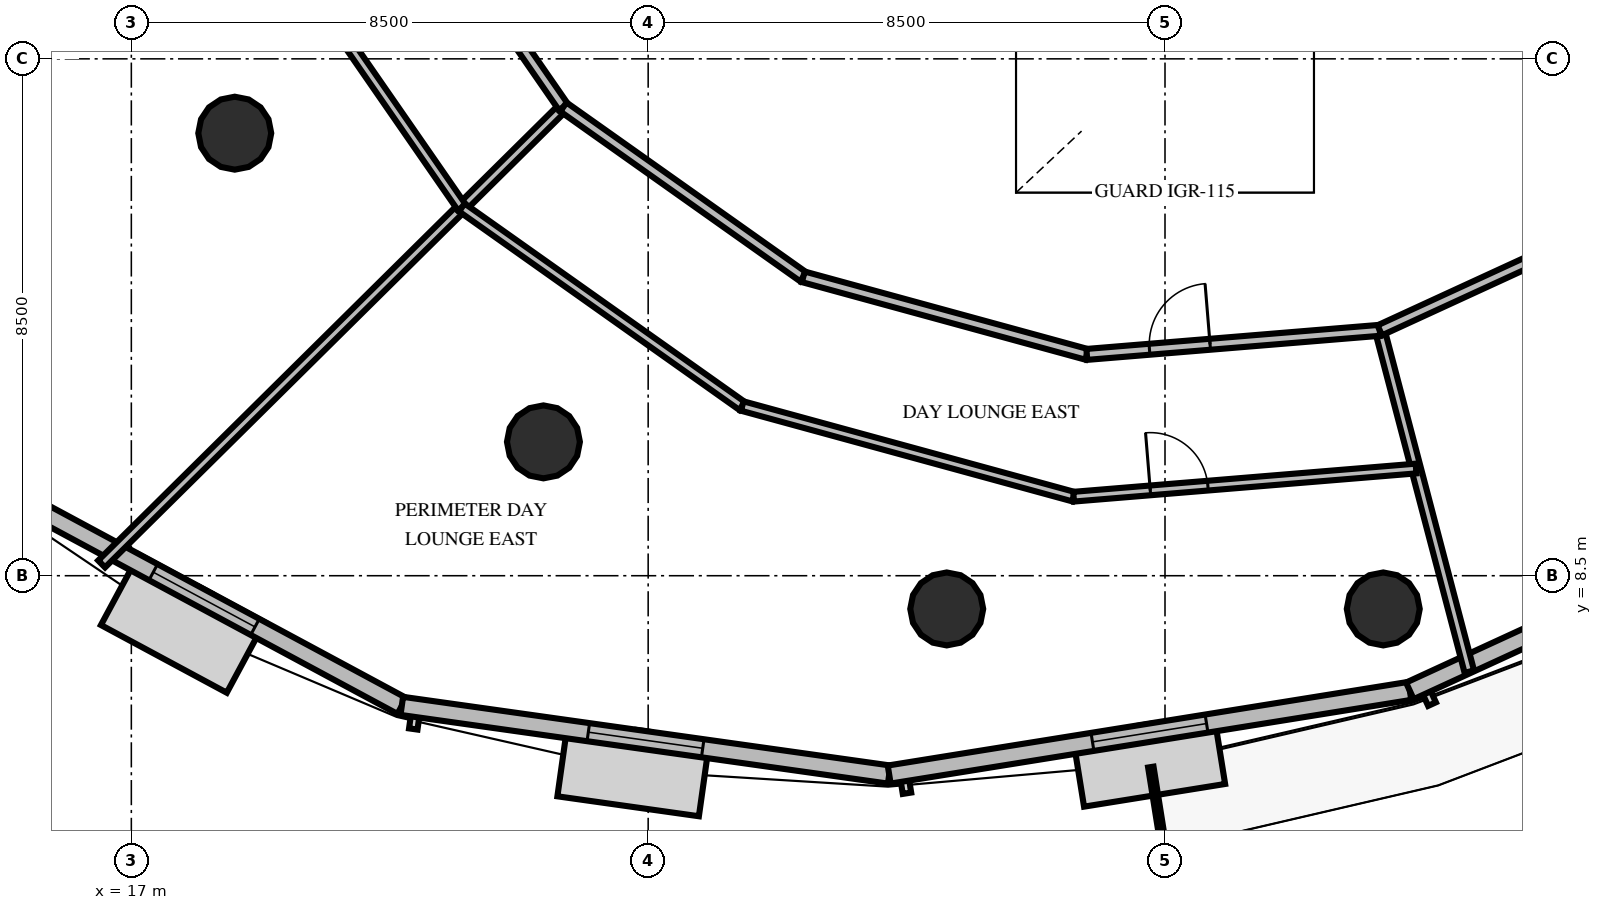
"""IFC4 building model, lengths in metres.
Left out: names, types, materials, properties, quantities, classifications, styles, units other than length and angle.
Written with IfcOpenShell. Run it as: python <this file> out.ifc"""

import sys

from ifc_helpers import new_model, si_unit, direction, frame, frame_2d, origin, origin_2d, place, context, subcontext, project, spatial, rectangle, circle, extrude, element, fill, save


model = new_model("IFC4")
c1 = context("Model", 3, precision=1e-05, world=origin(), true_north=direction((0.0, 1.0)))
c2 = subcontext(c1, "Body", "Model", "MODEL_VIEW")
j1 = project(units=[si_unit("LENGTHUNIT", "METRE"), si_unit("PLANEANGLEUNIT", "RADIAN")], contexts=[c1])
p1 = place(None, origin())
s1 = spatial("IfcSite", under=j1, at=p1, CompositionType="ELEMENT")
p2 = place(p1, origin())
s2 = spatial("IfcBuilding", under=s1, at=p2, CompositionType="ELEMENT")
p3 = place(p2, frame((0.0, 0.0, 137.8)))
s3 = spatial("IfcBuildingStorey", under=s2, at=p3, CompositionType="ELEMENT", Elevation=137.8)
for number, where, z_axis, x_axis in (
    (1, (18.701, 15.778, 0.0), (0.0, 0.0, 1.0), (1.0, 0.0, 0.0)),
    (2, (23.778, 10.701, 0.0), (0.0, 0.0, 1.0), (1.0, 0.0, 0.0)),
    (3, (30.41, 7.954, 0.0), (0.0, 0.0, 1.0), (1.0, 0.0, 0.0)),
    (4, (37.59, 7.954, 0.0), (0.0, 0.0, 1.0), (1.0, 0.0, 0.0)),
):
    element("IfcColumn", number, at=place(p3, frame(where, z_axis=z_axis, x_axis=x_axis)), inside=s3, PredefinedType="COLUMN", context=c2, shape_type="SweptSolid", body=[
        extrude(circle(Radius=0.6, at=origin_2d()), origin(), (0.0, 0.0, 1.0), 4.0),
    ])
p4 = place(p3, frame((14.946, 9.857, 0.0), z_axis=(0.0, 0.0, 1.0), x_axis=(0.880640929012, -0.473784290736, 0.0)))
e5 = element("IfcWall", 5, at=p4, inside=s3, PredefinedType="SOLIDWALL", context=c2, shape_type="SweptSolid", body=[
    extrude(rectangle(XDim=7.383, YDim=0.3, at=frame_2d((3.692, 0.0))), origin(), (0.0, 0.0, 1.0), 2.9),
])
p5 = place(p4, frame((2.742, 0.0, 0.8)))
e6 = element("IfcOpeningElement", 6, at=p5, cuts=e5, PredefinedType="OPENING", context=c2, shape_type="SweptSolid", body=[
    extrude(rectangle(XDim=1.9, YDim=1.95, at=frame_2d((0.95, 0.975))), frame((0.0, 0.16, 0.0), z_axis=(0.0, -1.0, 0.0), x_axis=(1.0, 0.0, 0.0)), (0.0, 0.0, 1.0), 0.32),
])
p6 = place(p3, frame((21.448, 6.359, 0.0), z_axis=(0.0, 0.0, 1.0), x_axis=(0.990224451803, -0.139483099518, 0.0)))
e7 = element("IfcWall", 7, at=p6, inside=s3, PredefinedType="SOLIDWALL", context=c2, shape_type="SweptSolid", body=[
    extrude(rectangle(XDim=8.095, YDim=0.3, at=frame_2d((4.048, 0.0))), origin(), (0.0, 0.0, 1.0), 2.9),
])
p7 = place(p6, frame((3.098, 0.0, 0.8)))
e8 = element("IfcOpeningElement", 8, at=p7, cuts=e7, PredefinedType="OPENING", context=c2, shape_type="SweptSolid", body=[
    extrude(rectangle(XDim=1.9, YDim=1.95, at=frame_2d((0.95, 0.975))), frame((0.0, 0.16, 0.0), z_axis=(0.0, -1.0, 0.0), x_axis=(1.0, 0.0, 0.0)), (0.0, 0.0, 1.0), 0.32),
])
p8 = place(p3, frame((29.464, 5.23, 0.0), z_axis=(0.0, 0.0, 1.0), x_axis=(0.987334308652, 0.158653594217, 0.0)))
e9 = element("IfcWall", 9, at=p8, inside=s3, PredefinedType="SOLIDWALL", context=c2, shape_type="SweptSolid", body=[
    extrude(rectangle(XDim=8.673, YDim=0.3, at=frame_2d((4.336, 0.0))), origin(), (0.0, 0.0, 1.0), 2.9),
])
p9 = place(p8, frame((3.386, 0.0, 0.8)))
e10 = element("IfcOpeningElement", 10, at=p9, cuts=e9, PredefinedType="OPENING", context=c2, shape_type="SweptSolid", body=[
    extrude(rectangle(XDim=1.9, YDim=1.95, at=frame_2d((0.95, 0.975))), frame((0.0, 0.16, 0.0), z_axis=(0.0, -1.0, 0.0), x_axis=(1.0, 0.0, 0.0)), (0.0, 0.0, 1.0), 0.32),
])
p10 = place(p3, frame((38.027, 6.606, 0.0), z_axis=(0.0, 0.0, 1.0), x_axis=(0.908512345051, 0.417858012835, 0.0)))
e11 = element("IfcWall", 11, at=p10, inside=s3, PredefinedType="SOLIDWALL", context=c2, shape_type="SweptSolid", body=[
    extrude(rectangle(XDim=8.891, YDim=0.3, at=frame_2d((4.445, 0.0))), origin(), (0.0, 0.0, 1.0), 2.9),
])
p11 = place(p10, frame((3.15, 0.0, 0.0)))
e12 = element("IfcOpeningElement", 12, at=p11, cuts=e11, PredefinedType="OPENING", context=c2, shape_type="SweptSolid", body=[
    extrude(rectangle(XDim=1.05, YDim=2.15, at=frame_2d((0.525, 1.075))), frame((0.0, 0.16, 0.0), z_axis=(0.0, -1.0, 0.0), x_axis=(1.0, 0.0, 0.0)), (0.0, 0.0, 1.0), 0.32),
])
p12 = place(p3, frame((24.106, 16.209, 0.0), z_axis=(0.0, 0.0, 1.0), x_axis=(-0.710810236464, -0.703383826754, 0.0)))
e13 = element("IfcWall", 13, at=p12, inside=s3, PredefinedType="PARTITIONING", context=c2, shape_type="SweptSolid", body=[
    extrude(rectangle(XDim=10.684, YDim=0.16, at=frame_2d((5.342, 0.0))), origin(), (0.0, 0.0, 1.0), 2.8),
])
p13 = place(p3, frame((21.354, 20.183, 0.0), z_axis=(0.0, 0.0, 1.0), x_axis=(0.569286130339, -0.822139466151, 0.0)))
e14 = element("IfcWall", 14, at=p13, inside=s3, PredefinedType="PARTITIONING", context=c2, shape_type="SweptSolid", body=[
    extrude(rectangle(XDim=4.834, YDim=0.18, at=frame_2d((2.417, 0.0))), origin(), (0.0, 0.0, 1.0), 2.8),
])
p14 = place(p3, frame((19.219, 19.201, 0.0), z_axis=(0.0, 0.0, 1.0), x_axis=(0.56929085893, -0.822136191843, 0.0)))
e15 = element("IfcWall", 15, at=p14, inside=s3, PredefinedType="PARTITIONING", context=c2, shape_type="SweptSolid", body=[
    extrude(rectangle(XDim=5.651, YDim=0.16, at=frame_2d((2.825, 0.0))), origin(), (0.0, 0.0, 1.0), 2.8),
])
p15 = place(p3, frame((37.532, 12.536, 0.0), z_axis=(0.0, 0.0, 1.0), x_axis=(0.253753983921, -0.967268791828, 0.0)))
e16 = element("IfcWall", 16, at=p15, inside=s3, PredefinedType="PARTITIONING", context=c2, shape_type="SweptSolid", body=[
    extrude(rectangle(XDim=5.803, YDim=0.16, at=frame_2d((2.902, 0.0))), origin(), (0.0, 0.0, 1.0), 2.8),
])
for number, where, z_axis, x_axis in (
    (17, (24.106, 16.209, 0.0), (0.0, 0.0, 1.0), (0.816, -0.578, 0.0)),
    (18, (28.051, 13.415, 0.0), (0.0, 0.0, 1.0), (0.965, -0.264, 0.0)),
):
    element("IfcWall", number, at=place(p3, frame(where, z_axis=z_axis, x_axis=x_axis)), inside=s3, PredefinedType="PARTITIONING", context=c2, shape_type="SweptSolid", body=[
        extrude(rectangle(XDim=4.834, YDim=0.18, at=frame_2d((2.417, 0.0))), origin(), (0.0, 0.0, 1.0), 2.8),
    ])
p16 = place(p3, frame((32.714, 12.139, 0.0), z_axis=(0.0, 0.0, 1.0), x_axis=(0.996635375419, 0.081962970069, 0.0)))
e19 = element("IfcWall", 19, at=p16, inside=s3, PredefinedType="PARTITIONING", context=c2, shape_type="SweptSolid", body=[
    extrude(rectangle(XDim=4.834, YDim=0.18, at=frame_2d((2.417, 0.0))), origin(), (0.0, 0.0, 1.0), 2.8),
])
p17 = place(p16, frame((1.034, 0.0, 0.0)))
e20 = element("IfcOpeningElement", 20, at=p17, cuts=e19, PredefinedType="OPENING", context=c2, shape_type="SweptSolid", body=[
    extrude(rectangle(XDim=1.0, YDim=2.15, at=frame_2d((0.5, 1.075))), frame((0.0, 0.1, 0.0), z_axis=(0.0, -1.0, 0.0), x_axis=(1.0, 0.0, 0.0)), (0.0, 0.0, 1.0), 0.2),
])
p18 = place(p3, frame((22.435, 14.556, 0.0), z_axis=(0.0, 0.0, 1.0), x_axis=(0.816120422412, -0.577881870388, 0.0)))
e21 = element("IfcWall", 21, at=p18, inside=s3, PredefinedType="PARTITIONING", context=c2, shape_type="SweptSolid", body=[
    extrude(rectangle(XDim=5.651, YDim=0.16, at=frame_2d((2.825, 0.0))), origin(), (0.0, 0.0, 1.0), 2.8),
])
p19 = place(p3, frame((27.047, 11.291, 0.0), z_axis=(0.0, 0.0, 1.0), x_axis=(0.96455912649, -0.263866806373, 0.0)))
e22 = element("IfcWall", 22, at=p19, inside=s3, PredefinedType="PARTITIONING", context=c2, shape_type="SweptSolid", body=[
    extrude(rectangle(XDim=5.65, YDim=0.16, at=frame_2d((2.825, 0.0))), origin(), (0.0, 0.0, 1.0), 2.8),
])
p20 = place(p3, frame((32.497, 9.8, 0.0), z_axis=(0.0, 0.0, 1.0), x_axis=(0.996635455181, 0.081962000194, 0.0)))
e23 = element("IfcWall", 23, at=p20, inside=s3, PredefinedType="PARTITIONING", context=c2, shape_type="SweptSolid", body=[
    extrude(rectangle(XDim=5.651, YDim=0.16, at=frame_2d((2.825, 0.0))), origin(), (0.0, 0.0, 1.0), 2.8),
])
p21 = place(p20, frame((1.265, 0.0, 0.0)))
e24 = element("IfcOpeningElement", 24, at=p21, cuts=e23, PredefinedType="OPENING", context=c2, shape_type="SweptSolid", body=[
    extrude(rectangle(XDim=0.95, YDim=2.15, at=frame_2d((0.475, 1.075))), frame((0.0, 0.09, 0.0), z_axis=(0.0, -1.0, 0.0), x_axis=(1.0, 0.0, 0.0)), (0.0, 0.0, 1.0), 0.18),
])
p22 = place(p3, frame((37.532, 12.536, 0.0), z_axis=(0.0, 0.0, 1.0), x_axis=(0.90849812175, 0.417888935935, 0.0)))
e25 = element("IfcWall", 25, at=p22, inside=s3, PredefinedType="PARTITIONING", context=c2, shape_type="SweptSolid", body=[
    extrude(rectangle(XDim=4.834, YDim=0.18, at=frame_2d((2.417, 0.0))), origin(), (0.0, 0.0, 1.0), 2.8),
])
p23 = place(p5, origin())
e26 = element("IfcWindow", 26, at=p23, inside=s3, PartitioningType="SINGLE_PANEL", PredefinedType="WINDOW", context=c2, shape_type="SweptSolid", body=[
    extrude(rectangle(XDim=1.9, YDim=1.95, at=frame_2d((0.95, 0.975))), frame((0.0, 0.03, 0.0), z_axis=(0.0, -1.0, 0.0), x_axis=(1.0, 0.0, 0.0)), (0.0, 0.0, 1.0), 0.06),
])
fill(e6, e26)
p24 = place(p7, origin())
e27 = element("IfcWindow", 27, at=p24, inside=s3, PartitioningType="SINGLE_PANEL", PredefinedType="WINDOW", context=c2, shape_type="SweptSolid", body=[
    extrude(rectangle(XDim=1.9, YDim=1.95, at=frame_2d((0.95, 0.975))), frame((0.0, 0.03, 0.0), z_axis=(0.0, -1.0, 0.0), x_axis=(1.0, 0.0, 0.0)), (0.0, 0.0, 1.0), 0.06),
])
fill(e8, e27)
p25 = place(p9, origin())
e28 = element("IfcWindow", 28, at=p25, inside=s3, PartitioningType="SINGLE_PANEL", PredefinedType="WINDOW", context=c2, shape_type="SweptSolid", body=[
    extrude(rectangle(XDim=1.9, YDim=1.95, at=frame_2d((0.95, 0.975))), frame((0.0, 0.03, 0.0), z_axis=(0.0, -1.0, 0.0), x_axis=(1.0, 0.0, 0.0)), (0.0, 0.0, 1.0), 0.06),
])
fill(e10, e28)
p26 = place(p17, origin())
e29 = element("IfcDoor", 29, at=p26, inside=s3, OperationType="SINGLE_SWING_RIGHT", PredefinedType="DOOR", context=c2, shape_type="SweptSolid", body=[
    extrude(rectangle(XDim=1.0, YDim=2.15, at=frame_2d((0.5, 1.075))), frame((0.0, 0.025, 0.0), z_axis=(0.0, -1.0, 0.0), x_axis=(1.0, 0.0, 0.0)), (0.0, 0.0, 1.0), 0.05),
])
fill(e20, e29)
p27 = place(p21, origin())
e30 = element("IfcDoor", 30, at=p27, inside=s3, OperationType="SINGLE_SWING_LEFT", PredefinedType="DOOR", context=c2, shape_type="SweptSolid", body=[
    extrude(rectangle(XDim=0.95, YDim=2.15, at=frame_2d((0.475, 1.075))), frame((0.0, 0.025, 0.0), z_axis=(0.0, -1.0, 0.0), x_axis=(1.0, 0.0, 0.0)), (0.0, 0.0, 1.0), 0.05),
])
fill(e24, e30)
save(model, sys.argv[1])
